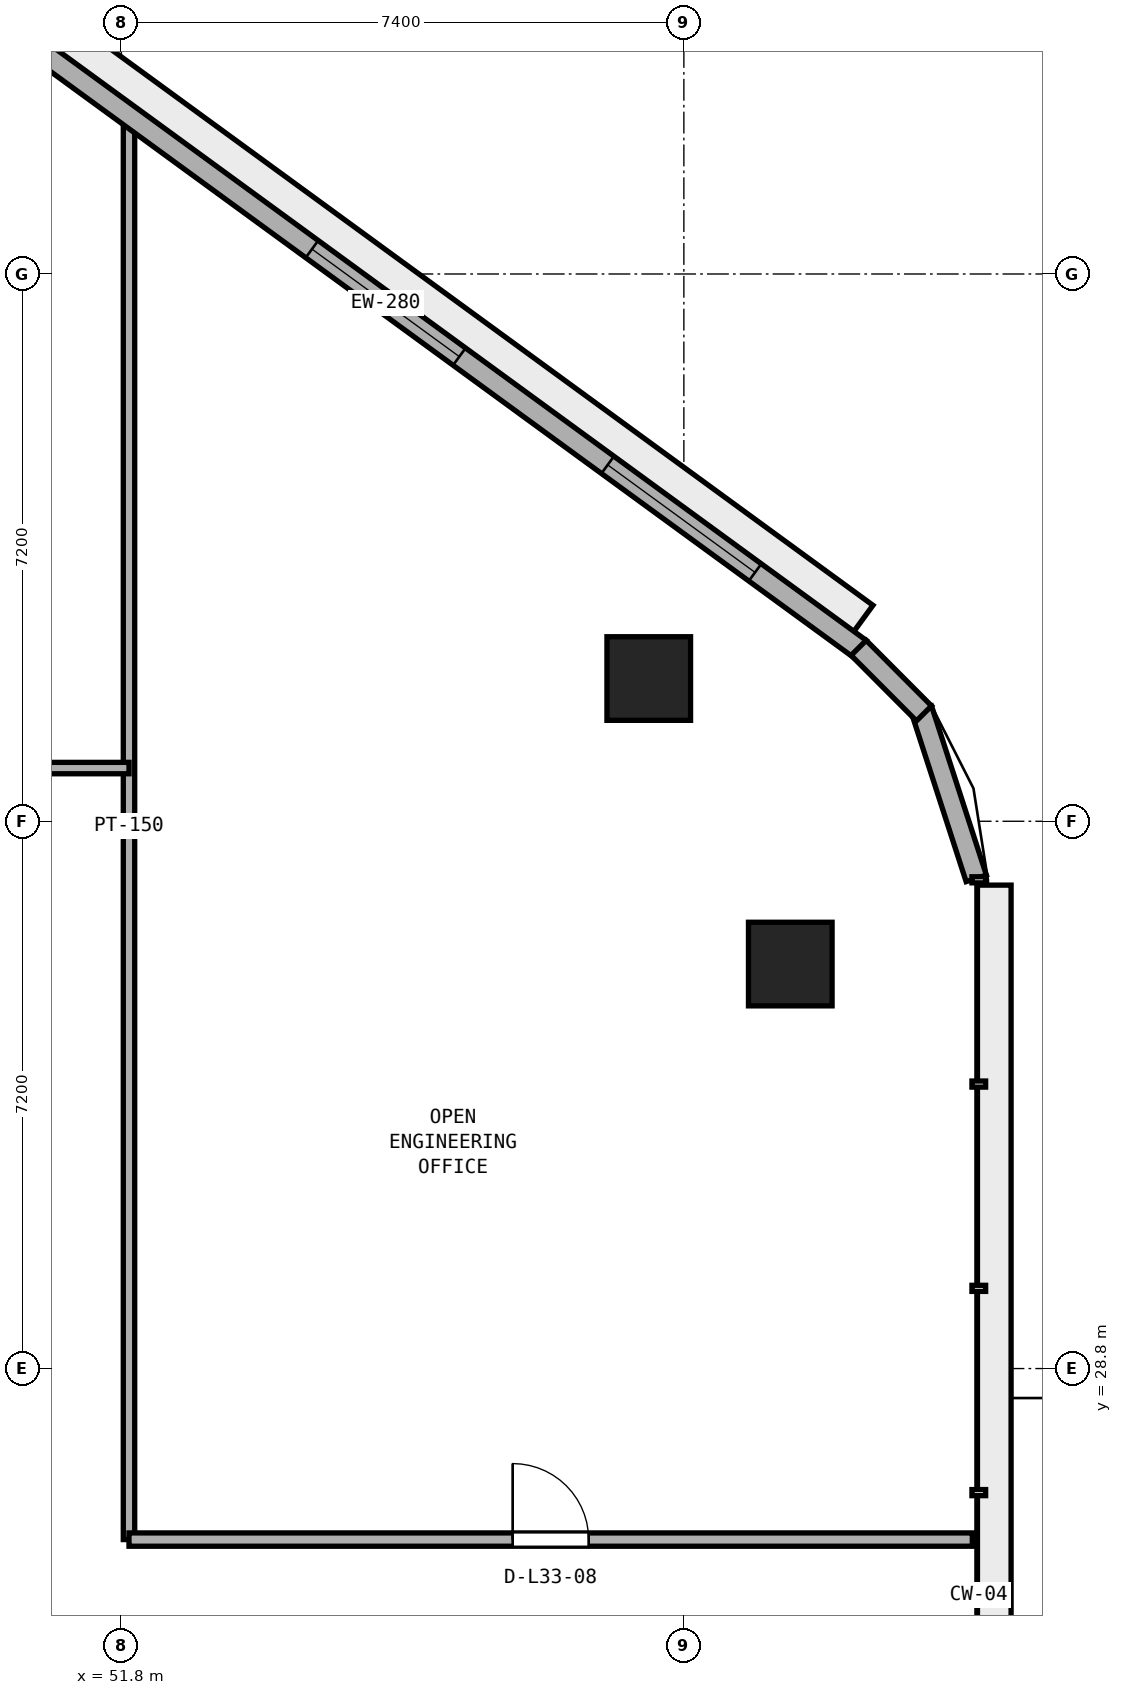
"""IFC4 building model, lengths in metres.
Left out: names, types, materials, properties, quantities, classifications, styles, units other than length and angle.
Written with IfcOpenShell. Run it as: python <this file> out.ifc"""

import sys

from ifc_helpers import new_model, si_unit, direction, frame, frame_2d, origin, origin_2d, place, context, subcontext, project, spatial, rectangle, extrude, element, fill, save


model = new_model("IFC4")
c1 = context("Model", 3, precision=1e-05, world=origin(), true_north=direction((0.0, 1.0)))
c2 = subcontext(c1, "Body", "Model", "MODEL_VIEW")
j1 = project(units=[si_unit("LENGTHUNIT", "METRE"), si_unit("PLANEANGLEUNIT", "RADIAN")], contexts=[c1])
p1 = place(None, origin())
s1 = spatial("IfcSite", under=j1, at=p1, CompositionType="ELEMENT")
p2 = place(p1, origin())
s2 = spatial("IfcBuilding", under=s1, at=p2, CompositionType="ELEMENT")
p3 = place(p2, frame((0.0, 0.0, 132.6)))
s3 = spatial("IfcBuildingStorey", under=s2, at=p3, CompositionType="ELEMENT", Elevation=132.6)
for number, where, z_axis, x_axis in (
    (1, (60.6, 34.122, 0.0), (0.0, 0.0, 1.0), (1.0, 0.0, 0.0)),
    (2, (58.738, 37.878, 0.0), (0.0, 0.0, 1.0), (1.0, 0.0, 0.0)),
):
    element("IfcColumn", number, at=place(p3, frame(where, z_axis=z_axis, x_axis=x_axis)), inside=s3, PredefinedType="COLUMN", context=c2, shape_type="SweptSolid", body=[
        extrude(rectangle(XDim=1.1, YDim=1.1, at=origin_2d()), origin(), (0.0, 0.0, 1.0), 3.8),
    ])
p4 = place(p3, frame((51.9, 26.55, 0.0), z_axis=(0.0, 0.0, 1.0), x_axis=(0.0, 1.0, 0.0)))
e3 = element("IfcWall", 3, at=p4, inside=s3, PredefinedType="PARTITIONING", context=c2, shape_type="SweptSolid", body=[
    extrude(rectangle(XDim=18.767, YDim=0.15, at=frame_2d((9.384, 0.0))), origin(), (0.0, 0.0, 1.0), 3.54),
])
p5 = place(p3, frame((51.9, 26.55, 0.0), z_axis=(0.0, 0.0, 1.0), x_axis=(1.0, 0.0, 0.0)))
e4 = element("IfcWall", 4, at=p5, inside=s3, PredefinedType="PARTITIONING", context=c2, shape_type="SweptSolid", body=[
    extrude(rectangle(XDim=11.095, YDim=0.175, at=frame_2d((5.548, 0.0))), origin(), (0.0, 0.0, 1.0), 3.54),
])
p6 = place(p5, frame((5.048, 0.0, 0.0)))
e5 = element("IfcOpeningElement", 5, at=p6, cuts=e4, PredefinedType="OPENING", context=c2, shape_type="SweptSolid", body=[
    extrude(rectangle(XDim=1.0, YDim=2.12, at=frame_2d((0.5, 1.06))), frame((0.0, 0.097, 0.0), z_axis=(0.0, -1.0, 0.0), x_axis=(1.0, 0.0, 0.0)), (0.0, 0.0, 1.0), 0.195),
])
p7 = place(p3, frame((22.1, 36.7, 0.0), z_axis=(0.0, 0.0, 1.0), x_axis=(1.0, 0.0, 0.0)))
e6 = element("IfcWall", 6, at=p7, inside=s3, PredefinedType="PARTITIONING", context=c2, shape_type="SweptSolid", body=[
    extrude(rectangle(XDim=29.8, YDim=0.15, at=frame_2d((14.9, 0.0))), origin(), (0.0, 0.0, 1.0), 3.54),
])
p8 = place(p7, frame((14.4, 0.0, 0.0)))
e7 = element("IfcOpeningElement", 7, at=p8, cuts=e6, PredefinedType="OPENING", context=c2, shape_type="SweptSolid", body=[
    extrude(rectangle(XDim=1.0, YDim=2.12, at=frame_2d((0.5, 1.06))), frame((0.0, 0.085, 0.0), z_axis=(0.0, -1.0, 0.0), x_axis=(1.0, 0.0, 0.0)), (0.0, 0.0, 1.0), 0.17),
])
p9 = place(p3, frame((61.516, 38.267, 0.0), z_axis=(0.0, 0.0, 1.0), x_axis=(-0.807812505785, 0.589439526582, 0.0)))
e8 = element("IfcWall", 8, at=p9, inside=s3, PredefinedType="STANDARD", context=c2, shape_type="SweptSolid", body=[
    extrude(rectangle(XDim=15.448, YDim=0.28, at=frame_2d((7.724, 0.0))), origin(), (0.0, 0.0, 1.0), 3.54),
])
p10 = place(p9, frame((1.708, 0.0, 0.9)))
e9 = element("IfcOpeningElement", 9, at=p10, cuts=e8, PredefinedType="OPENING", context=c2, shape_type="SweptSolid", body=[
    extrude(rectangle(XDim=2.4, YDim=1.75, at=frame_2d((1.2, 0.875))), frame((0.0, 0.15, 0.0), z_axis=(0.0, -1.0, 0.0), x_axis=(1.0, 0.0, 0.0)), (0.0, 0.0, 1.0), 0.3),
])
p11 = place(p9, frame((6.524, 0.0, 0.9)))
e10 = element("IfcOpeningElement", 10, at=p11, cuts=e8, PredefinedType="OPENING", context=c2, shape_type="SweptSolid", body=[
    extrude(rectangle(XDim=2.4, YDim=1.75, at=frame_2d((1.2, 0.875))), frame((0.0, 0.15, 0.0), z_axis=(0.0, -1.0, 0.0), x_axis=(1.0, 0.0, 0.0)), (0.0, 0.0, 1.0), 0.3),
])
p12 = place(p3, frame((63.047, 35.249, 0.0), z_axis=(0.0, 0.0, 1.0), x_axis=(-0.308392438545, 0.951259220112, 0.0)))
e11 = element("IfcWall", 11, at=p12, inside=s3, PredefinedType="STANDARD", context=c2, shape_type="SweptSolid", body=[
    extrude(rectangle(XDim=2.34, YDim=0.28, at=frame_2d((1.17, 0.0))), origin(), (0.0, 0.0, 1.0), 3.54),
])
p13 = place(p3, frame((62.359, 37.419, 0.0), z_axis=(0.0, 0.0, 1.0), x_axis=(-0.706003104649, 0.708208737751, 0.0)))
e12 = element("IfcWall", 12, at=p13, inside=s3, PredefinedType="STANDARD", context=c2, shape_type="SweptSolid", body=[
    extrude(rectangle(XDim=1.218, YDim=0.28, at=frame_2d((0.609, 0.0))), origin(), (0.0, 0.0, 1.0), 3.54),
])
p14 = place(p6, origin())
e13 = element("IfcDoor", 13, at=p14, inside=s3, OperationType="SINGLE_SWING_LEFT", PredefinedType="DOOR", context=c2, shape_type="SweptSolid", body=[
    extrude(rectangle(XDim=1.0, YDim=2.12, at=frame_2d((0.5, 1.06))), frame((0.0, 0.025, 0.0), z_axis=(0.0, -1.0, 0.0), x_axis=(1.0, 0.0, 0.0)), (0.0, 0.0, 1.0), 0.05),
])
fill(e5, e13)
p15 = place(p10, origin())
e14 = element("IfcWindow", 14, at=p15, inside=s3, PartitioningType="SINGLE_PANEL", PredefinedType="WINDOW", context=c2, shape_type="SweptSolid", body=[
    extrude(rectangle(XDim=2.4, YDim=1.75, at=frame_2d((1.2, 0.875))), frame((0.0, 0.03, 0.0), z_axis=(0.0, -1.0, 0.0), x_axis=(1.0, 0.0, 0.0)), (0.0, 0.0, 1.0), 0.06),
])
fill(e9, e14)
p16 = place(p11, origin())
e15 = element("IfcWindow", 15, at=p16, inside=s3, PartitioningType="SINGLE_PANEL", PredefinedType="WINDOW", context=c2, shape_type="SweptSolid", body=[
    extrude(rectangle(XDim=2.4, YDim=1.75, at=frame_2d((1.2, 0.875))), frame((0.0, 0.03, 0.0), z_axis=(0.0, -1.0, 0.0), x_axis=(1.0, 0.0, 0.0)), (0.0, 0.0, 1.0), 0.06),
])
fill(e10, e15)
save(model, sys.argv[1])
